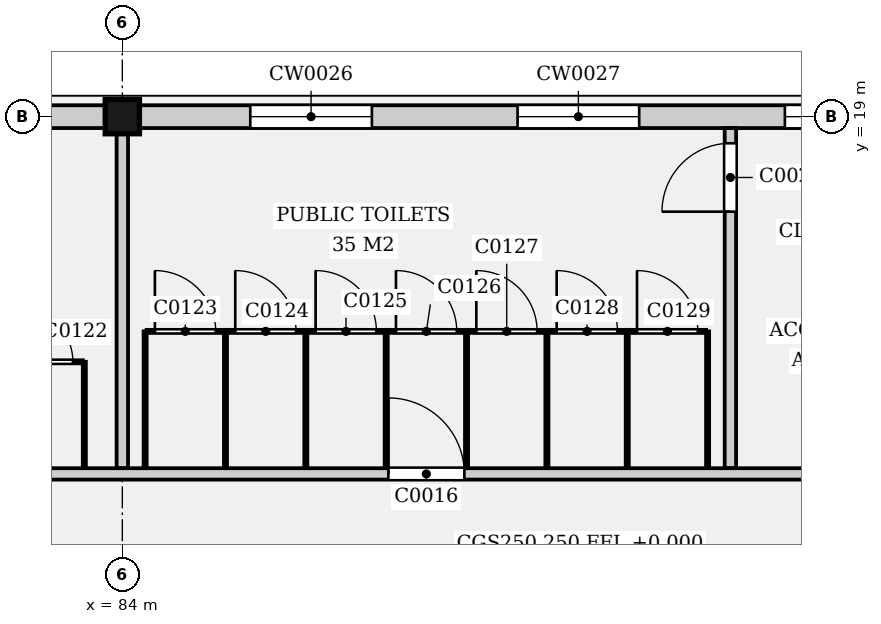
"""IFC4 building model, lengths in metres.
Left out: names, types, materials, properties, quantities, classifications, styles, units other than length and angle.
Written with IfcOpenShell. Run it as: python <this file> out.ifc"""

import sys

from ifc_helpers import new_model, si_unit, direction, frame, frame_2d, origin, origin_2d, place, context, subcontext, project, spatial, rectangle, extrude, element, fill, save


model = new_model("IFC4")
c1 = context("Model", 3, precision=1e-05, world=origin(), true_north=direction((0.0, 1.0)))
c2 = subcontext(c1, "Body", "Model", "MODEL_VIEW")
j1 = project(units=[si_unit("LENGTHUNIT", "METRE"), si_unit("PLANEANGLEUNIT", "RADIAN")], contexts=[c1])
p1 = place(None, origin())
s1 = spatial("IfcSite", under=j1, at=p1, CompositionType="ELEMENT")
p2 = place(p1, origin())
s2 = spatial("IfcBuilding", under=s1, at=p2, CompositionType="ELEMENT")
p3 = place(p2, origin())
s3 = spatial("IfcBuildingStorey", under=s2, at=p3, CompositionType="ELEMENT", Elevation=0.0)
p4 = place(p3, frame((84.0, 19.0, -0.25), z_axis=(0.0, 0.0, 1.0), x_axis=(1.0, 0.0, 0.0)))
e1 = element("IfcColumn", 1, at=p4, inside=s3, PredefinedType="COLUMN", context=c2, shape_type="SweptSolid", body=[
    extrude(rectangle(XDim=0.45, YDim=0.45, at=origin_2d()), origin(), (0.0, 0.0, 1.0), 5.25),
])
p5 = place(p3, frame((72.225, 19.0, 0.0), z_axis=(0.0, 0.0, 1.0), x_axis=(1.0, 0.0, 0.0)))
e2 = element("IfcWall", 2, at=p5, inside=s3, PredefinedType="ELEMENTEDWALL", context=c2, shape_type="SweptSolid", body=[
    extrude(rectangle(XDim=11.55, YDim=0.3, at=frame_2d((5.775, 0.0))), origin(), (0.0, 0.0, 1.0), 4.6),
])
p6 = place(p5, frame((1.458, 0.0, 2.5)))
e3 = element("IfcOpeningElement", 3, at=p6, cuts=e2, PredefinedType="OPENING", context=c2, shape_type="SweptSolid", body=[
    extrude(rectangle(XDim=1.6, YDim=1.0, at=frame_2d((0.8, 0.5))), frame((0.0, 0.16, 0.0), z_axis=(0.0, -1.0, 0.0), x_axis=(1.0, 0.0, 0.0)), (0.0, 0.0, 1.0), 0.32),
])
p7 = place(p5, frame((8.492, 0.0, 2.5)))
e4 = element("IfcOpeningElement", 4, at=p7, cuts=e2, PredefinedType="OPENING", context=c2, shape_type="SweptSolid", body=[
    extrude(rectangle(XDim=1.6, YDim=1.0, at=frame_2d((0.8, 0.5))), frame((0.0, 0.16, 0.0), z_axis=(0.0, -1.0, 0.0), x_axis=(1.0, 0.0, 0.0)), (0.0, 0.0, 1.0), 0.32),
])
p8 = place(p5, frame((4.875, 0.0, 0.0)))
e5 = element("IfcOpeningElement", 5, at=p8, cuts=e2, PredefinedType="OPENING", context=c2, shape_type="SweptSolid", body=[
    extrude(rectangle(XDim=1.8, YDim=2.4, at=frame_2d((0.9, 1.2))), frame((0.0, 0.16, 0.0), z_axis=(0.0, -1.0, 0.0), x_axis=(1.0, 0.0, 0.0)), (0.0, 0.0, 1.0), 0.32),
])
p9 = place(p3, frame((84.225, 19.0, 0.0), z_axis=(0.0, 0.0, 1.0), x_axis=(1.0, 0.0, 0.0)))
e6 = element("IfcWall", 6, at=p9, inside=s3, PredefinedType="ELEMENTEDWALL", context=c2, shape_type="SweptSolid", body=[
    extrude(rectangle(XDim=11.55, YDim=0.3, at=frame_2d((5.775, 0.0))), origin(), (0.0, 0.0, 1.0), 4.6),
])
p10 = place(p9, frame((1.458, 0.0, 2.5)))
e7 = element("IfcOpeningElement", 7, at=p10, cuts=e6, PredefinedType="OPENING", context=c2, shape_type="SweptSolid", body=[
    extrude(rectangle(XDim=1.6, YDim=1.0, at=frame_2d((0.8, 0.5))), frame((0.0, 0.16, 0.0), z_axis=(0.0, -1.0, 0.0), x_axis=(1.0, 0.0, 0.0)), (0.0, 0.0, 1.0), 0.32),
])
p11 = place(p9, frame((4.975, 0.0, 2.5)))
e8 = element("IfcOpeningElement", 8, at=p11, cuts=e6, PredefinedType="OPENING", context=c2, shape_type="SweptSolid", body=[
    extrude(rectangle(XDim=1.6, YDim=1.0, at=frame_2d((0.8, 0.5))), frame((0.0, 0.16, 0.0), z_axis=(0.0, -1.0, 0.0), x_axis=(1.0, 0.0, 0.0)), (0.0, 0.0, 1.0), 0.32),
])
p12 = place(p9, frame((8.492, 0.0, 2.5)))
e9 = element("IfcOpeningElement", 9, at=p12, cuts=e6, PredefinedType="OPENING", context=c2, shape_type="SweptSolid", body=[
    extrude(rectangle(XDim=1.6, YDim=1.0, at=frame_2d((0.8, 0.5))), frame((0.0, 0.16, 0.0), z_axis=(0.0, -1.0, 0.0), x_axis=(1.0, 0.0, 0.0)), (0.0, 0.0, 1.0), 0.32),
])
p13 = place(p3, frame((55.3, 14.3, 0.0), z_axis=(0.0, 0.0, 1.0), x_axis=(1.0, 0.0, 0.0)))
e10 = element("IfcWall", 10, at=p13, inside=s3, PredefinedType="PARTITIONING", context=c2, shape_type="SweptSolid", body=[
    extrude(rectangle(XDim=93.4, YDim=0.15, at=frame_2d((46.7, 0.0))), origin(), (0.0, 0.0, 1.0), 4.6),
])
p14 = place(p13, frame((15.8, 0.0, 0.0)))
e11 = element("IfcOpeningElement", 11, at=p14, cuts=e10, PredefinedType="OPENING", context=c2, shape_type="SweptSolid", body=[
    extrude(rectangle(XDim=1.8, YDim=2.4, at=frame_2d((0.9, 1.2))), frame((0.0, 0.085, 0.0), z_axis=(0.0, -1.0, 0.0), x_axis=(1.0, 0.0, 0.0)), (0.0, 0.0, 1.0), 0.17),
])
p15 = place(p13, frame((32.2, 0.0, 0.0)))
e12 = element("IfcOpeningElement", 12, at=p15, cuts=e10, PredefinedType="OPENING", context=c2, shape_type="SweptSolid", body=[
    extrude(rectangle(XDim=1.0, YDim=2.1, at=frame_2d((0.5, 1.05))), frame((0.0, 0.085, 0.0), z_axis=(0.0, -1.0, 0.0), x_axis=(1.0, 0.0, 0.0)), (0.0, 0.0, 1.0), 0.17),
])
p16 = place(p13, frame((38.2, 0.0, 0.0)))
e13 = element("IfcOpeningElement", 13, at=p16, cuts=e10, PredefinedType="OPENING", context=c2, shape_type="SweptSolid", body=[
    extrude(rectangle(XDim=1.0, YDim=2.1, at=frame_2d((0.5, 1.05))), frame((0.0, 0.085, 0.0), z_axis=(0.0, -1.0, 0.0), x_axis=(1.0, 0.0, 0.0)), (0.0, 0.0, 1.0), 0.17),
])
p17 = place(p13, frame((43.2, 0.0, 0.0)))
e14 = element("IfcOpeningElement", 14, at=p17, cuts=e10, PredefinedType="OPENING", context=c2, shape_type="SweptSolid", body=[
    extrude(rectangle(XDim=1.0, YDim=2.1, at=frame_2d((0.5, 1.05))), frame((0.0, 0.085, 0.0), z_axis=(0.0, -1.0, 0.0), x_axis=(1.0, 0.0, 0.0)), (0.0, 0.0, 1.0), 0.17),
])
p18 = place(p13, frame((49.2, 0.0, 0.0)))
e15 = element("IfcOpeningElement", 15, at=p18, cuts=e10, PredefinedType="OPENING", context=c2, shape_type="SweptSolid", body=[
    extrude(rectangle(XDim=1.0, YDim=2.1, at=frame_2d((0.5, 1.05))), frame((0.0, 0.085, 0.0), z_axis=(0.0, -1.0, 0.0), x_axis=(1.0, 0.0, 0.0)), (0.0, 0.0, 1.0), 0.17),
])
p19 = place(p13, frame((57.8, 0.0, 0.0)))
e16 = element("IfcOpeningElement", 16, at=p19, cuts=e10, PredefinedType="OPENING", context=c2, shape_type="SweptSolid", body=[
    extrude(rectangle(XDim=1.8, YDim=2.4, at=frame_2d((0.9, 1.2))), frame((0.0, 0.085, 0.0), z_axis=(0.0, -1.0, 0.0), x_axis=(1.0, 0.0, 0.0)), (0.0, 0.0, 1.0), 0.17),
])
p20 = place(p13, frame((69.8, 0.0, 0.0)))
e17 = element("IfcOpeningElement", 17, at=p20, cuts=e10, PredefinedType="OPENING", context=c2, shape_type="SweptSolid", body=[
    extrude(rectangle(XDim=1.8, YDim=2.4, at=frame_2d((0.9, 1.2))), frame((0.0, 0.085, 0.0), z_axis=(0.0, -1.0, 0.0), x_axis=(1.0, 0.0, 0.0)), (0.0, 0.0, 1.0), 0.17),
])
p21 = place(p13, frame((82.2, 0.0, 0.0)))
e18 = element("IfcOpeningElement", 18, at=p21, cuts=e10, PredefinedType="OPENING", context=c2, shape_type="SweptSolid", body=[
    extrude(rectangle(XDim=1.0, YDim=2.1, at=frame_2d((0.5, 1.05))), frame((0.0, 0.085, 0.0), z_axis=(0.0, -1.0, 0.0), x_axis=(1.0, 0.0, 0.0)), (0.0, 0.0, 1.0), 0.17),
])
p22 = place(p3, frame((84.0, 14.375, 0.0), z_axis=(0.0, 0.0, 1.0), x_axis=(0.0, 1.0, 0.0)))
e19 = element("IfcWall", 19, at=p22, inside=s3, PredefinedType="PARTITIONING", context=c2, shape_type="SweptSolid", body=[
    extrude(rectangle(XDim=4.4, YDim=0.15, at=frame_2d((2.2, 0.0))), origin(), (0.0, 0.0, 1.0), 4.6),
])
p23 = place(p3, frame((92.0, 14.375, 0.0), z_axis=(0.0, 0.0, 1.0), x_axis=(0.0, 1.0, 0.0)))
e20 = element("IfcWall", 20, at=p23, inside=s3, PredefinedType="PARTITIONING", context=c2, shape_type="SweptSolid", body=[
    extrude(rectangle(XDim=4.475, YDim=0.15, at=frame_2d((2.238, 0.0))), origin(), (0.0, 0.0, 1.0), 4.6),
])
p24 = place(p23, frame((3.375, 0.0, 0.0)))
e21 = element("IfcOpeningElement", 21, at=p24, cuts=e20, PredefinedType="OPENING", context=c2, shape_type="SweptSolid", body=[
    extrude(rectangle(XDim=0.9, YDim=2.1, at=frame_2d((0.45, 1.05))), frame((0.0, 0.085, 0.0), z_axis=(0.0, -1.0, 0.0), x_axis=(1.0, 0.0, 0.0)), (0.0, 0.0, 1.0), 0.17),
])
p25 = place(p3, frame((83.5, 14.375, 0.0), z_axis=(0.0, 0.0, 1.0), x_axis=(0.0, 1.0, 0.0)))
e22 = element("IfcWall", 22, at=p25, inside=s3, PredefinedType="PARTITIONING", context=c2, shape_type="SweptSolid", body=[
    extrude(rectangle(XDim=1.4, YDim=0.04, at=frame_2d((0.7, 0.0))), origin(), (0.0, 0.0, 1.0), 2.4),
])
p26 = place(p3, frame((82.52, 15.775, 0.0), z_axis=(0.0, 0.0, 1.0), x_axis=(1.0, 0.0, 0.0)))
e23 = element("IfcWall", 23, at=p26, inside=s3, PredefinedType="PARTITIONING", context=c2, shape_type="SweptSolid", body=[
    extrude(rectangle(XDim=0.96, YDim=0.04, at=frame_2d((0.48, 0.0))), origin(), (0.0, 0.0, 1.0), 2.4),
])
p27 = place(p26, frame((0.13, 0.0, 0.0)))
e24 = element("IfcOpeningElement", 24, at=p27, cuts=e23, PredefinedType="OPENING", context=c2, shape_type="SweptSolid", body=[
    extrude(rectangle(XDim=0.7, YDim=2.0, at=frame_2d((0.35, 1.0))), frame((0.0, 0.03, 0.0), z_axis=(0.0, -1.0, 0.0), x_axis=(1.0, 0.0, 0.0)), (0.0, 0.0, 1.0), 0.06),
])
for number, where, z_axis, x_axis in (
    (25, (84.3, 14.375, 0.0), (0.0, 0.0, 1.0), (0.0, 1.0, 0.0)),
    (26, (85.357, 14.375, 0.0), (0.0, 0.0, 1.0), (0.0, 1.0, 0.0)),
    (27, (86.414, 14.375, 0.0), (0.0, 0.0, 1.0), (0.0, 1.0, 0.0)),
    (28, (87.471, 14.375, 0.0), (0.0, 0.0, 1.0), (0.0, 1.0, 0.0)),
    (29, (88.529, 14.375, 0.0), (0.0, 0.0, 1.0), (0.0, 1.0, 0.0)),
    (30, (89.586, 14.375, 0.0), (0.0, 0.0, 1.0), (0.0, 1.0, 0.0)),
    (31, (90.643, 14.375, 0.0), (0.0, 0.0, 1.0), (0.0, 1.0, 0.0)),
    (32, (91.7, 14.375, 0.0), (0.0, 0.0, 1.0), (0.0, 1.0, 0.0)),
):
    element("IfcWall", number, at=place(p3, frame(where, z_axis=z_axis, x_axis=x_axis)), inside=s3, PredefinedType="PARTITIONING", context=c2, shape_type="SweptSolid", body=[
        extrude(rectangle(XDim=1.8, YDim=0.04, at=frame_2d((0.9, 0.0))), origin(), (0.0, 0.0, 1.0), 2.4),
    ])
p28 = place(p3, frame((84.32, 16.175, 0.0), z_axis=(0.0, 0.0, 1.0), x_axis=(1.0, 0.0, 0.0)))
e33 = element("IfcWall", 33, at=p28, inside=s3, PredefinedType="PARTITIONING", context=c2, shape_type="SweptSolid", body=[
    extrude(rectangle(XDim=1.017, YDim=0.04, at=frame_2d((0.509, 0.0))), origin(), (0.0, 0.0, 1.0), 2.4),
])
p29 = place(p28, frame((0.109, 0.0, 0.0)))
e34 = element("IfcOpeningElement", 34, at=p29, cuts=e33, PredefinedType="OPENING", context=c2, shape_type="SweptSolid", body=[
    extrude(rectangle(XDim=0.8, YDim=2.0, at=frame_2d((0.4, 1.0))), frame((0.0, 0.03, 0.0), z_axis=(0.0, -1.0, 0.0), x_axis=(1.0, 0.0, 0.0)), (0.0, 0.0, 1.0), 0.06),
])
p30 = place(p3, frame((85.377, 16.175, 0.0), z_axis=(0.0, 0.0, 1.0), x_axis=(1.0, 0.0, 0.0)))
e35 = element("IfcWall", 35, at=p30, inside=s3, PredefinedType="PARTITIONING", context=c2, shape_type="SweptSolid", body=[
    extrude(rectangle(XDim=1.017, YDim=0.04, at=frame_2d((0.509, 0.0))), origin(), (0.0, 0.0, 1.0), 2.4),
])
p31 = place(p30, frame((0.109, 0.0, 0.0)))
e36 = element("IfcOpeningElement", 36, at=p31, cuts=e35, PredefinedType="OPENING", context=c2, shape_type="SweptSolid", body=[
    extrude(rectangle(XDim=0.8, YDim=2.0, at=frame_2d((0.4, 1.0))), frame((0.0, 0.03, 0.0), z_axis=(0.0, -1.0, 0.0), x_axis=(1.0, 0.0, 0.0)), (0.0, 0.0, 1.0), 0.06),
])
p32 = place(p3, frame((86.434, 16.175, 0.0), z_axis=(0.0, 0.0, 1.0), x_axis=(1.0, 0.0, 0.0)))
e37 = element("IfcWall", 37, at=p32, inside=s3, PredefinedType="PARTITIONING", context=c2, shape_type="SweptSolid", body=[
    extrude(rectangle(XDim=1.017, YDim=0.04, at=frame_2d((0.509, 0.0))), origin(), (0.0, 0.0, 1.0), 2.4),
])
p33 = place(p32, frame((0.109, 0.0, 0.0)))
e38 = element("IfcOpeningElement", 38, at=p33, cuts=e37, PredefinedType="OPENING", context=c2, shape_type="SweptSolid", body=[
    extrude(rectangle(XDim=0.8, YDim=2.0, at=frame_2d((0.4, 1.0))), frame((0.0, 0.03, 0.0), z_axis=(0.0, -1.0, 0.0), x_axis=(1.0, 0.0, 0.0)), (0.0, 0.0, 1.0), 0.06),
])
p34 = place(p3, frame((87.491, 16.175, 0.0), z_axis=(0.0, 0.0, 1.0), x_axis=(1.0, 0.0, 0.0)))
e39 = element("IfcWall", 39, at=p34, inside=s3, PredefinedType="PARTITIONING", context=c2, shape_type="SweptSolid", body=[
    extrude(rectangle(XDim=1.017, YDim=0.04, at=frame_2d((0.509, 0.0))), origin(), (0.0, 0.0, 1.0), 2.4),
])
p35 = place(p34, frame((0.109, 0.0, 0.0)))
e40 = element("IfcOpeningElement", 40, at=p35, cuts=e39, PredefinedType="OPENING", context=c2, shape_type="SweptSolid", body=[
    extrude(rectangle(XDim=0.8, YDim=2.0, at=frame_2d((0.4, 1.0))), frame((0.0, 0.03, 0.0), z_axis=(0.0, -1.0, 0.0), x_axis=(1.0, 0.0, 0.0)), (0.0, 0.0, 1.0), 0.06),
])
p36 = place(p3, frame((88.549, 16.175, 0.0), z_axis=(0.0, 0.0, 1.0), x_axis=(1.0, 0.0, 0.0)))
e41 = element("IfcWall", 41, at=p36, inside=s3, PredefinedType="PARTITIONING", context=c2, shape_type="SweptSolid", body=[
    extrude(rectangle(XDim=1.017, YDim=0.04, at=frame_2d((0.509, 0.0))), origin(), (0.0, 0.0, 1.0), 2.4),
])
p37 = place(p36, frame((0.109, 0.0, 0.0)))
e42 = element("IfcOpeningElement", 42, at=p37, cuts=e41, PredefinedType="OPENING", context=c2, shape_type="SweptSolid", body=[
    extrude(rectangle(XDim=0.8, YDim=2.0, at=frame_2d((0.4, 1.0))), frame((0.0, 0.03, 0.0), z_axis=(0.0, -1.0, 0.0), x_axis=(1.0, 0.0, 0.0)), (0.0, 0.0, 1.0), 0.06),
])
p38 = place(p3, frame((89.606, 16.175, 0.0), z_axis=(0.0, 0.0, 1.0), x_axis=(1.0, 0.0, 0.0)))
e43 = element("IfcWall", 43, at=p38, inside=s3, PredefinedType="PARTITIONING", context=c2, shape_type="SweptSolid", body=[
    extrude(rectangle(XDim=1.017, YDim=0.04, at=frame_2d((0.509, 0.0))), origin(), (0.0, 0.0, 1.0), 2.4),
])
p39 = place(p38, frame((0.109, 0.0, 0.0)))
e44 = element("IfcOpeningElement", 44, at=p39, cuts=e43, PredefinedType="OPENING", context=c2, shape_type="SweptSolid", body=[
    extrude(rectangle(XDim=0.8, YDim=2.0, at=frame_2d((0.4, 1.0))), frame((0.0, 0.03, 0.0), z_axis=(0.0, -1.0, 0.0), x_axis=(1.0, 0.0, 0.0)), (0.0, 0.0, 1.0), 0.06),
])
p40 = place(p3, frame((90.663, 16.175, 0.0), z_axis=(0.0, 0.0, 1.0), x_axis=(1.0, 0.0, 0.0)))
e45 = element("IfcWall", 45, at=p40, inside=s3, PredefinedType="PARTITIONING", context=c2, shape_type="SweptSolid", body=[
    extrude(rectangle(XDim=1.017, YDim=0.04, at=frame_2d((0.509, 0.0))), origin(), (0.0, 0.0, 1.0), 2.4),
])
p41 = place(p40, frame((0.109, 0.0, 0.0)))
e46 = element("IfcOpeningElement", 46, at=p41, cuts=e45, PredefinedType="OPENING", context=c2, shape_type="SweptSolid", body=[
    extrude(rectangle(XDim=0.8, YDim=2.0, at=frame_2d((0.4, 1.0))), frame((0.0, 0.03, 0.0), z_axis=(0.0, -1.0, 0.0), x_axis=(1.0, 0.0, 0.0)), (0.0, 0.0, 1.0), 0.06),
])
p42 = place(p10, origin())
e47 = element("IfcWindow", 47, at=p42, inside=s3, PartitioningType="SINGLE_PANEL", PredefinedType="WINDOW", context=c2, shape_type="SweptSolid", body=[
    extrude(rectangle(XDim=1.6, YDim=1.0, at=frame_2d((0.8, 0.5))), frame((0.0, 0.03, 0.0), z_axis=(0.0, -1.0, 0.0), x_axis=(1.0, 0.0, 0.0)), (0.0, 0.0, 1.0), 0.06),
])
fill(e7, e47)
p43 = place(p11, origin())
e48 = element("IfcWindow", 48, at=p43, inside=s3, PartitioningType="SINGLE_PANEL", PredefinedType="WINDOW", context=c2, shape_type="SweptSolid", body=[
    extrude(rectangle(XDim=1.6, YDim=1.0, at=frame_2d((0.8, 0.5))), frame((0.0, 0.03, 0.0), z_axis=(0.0, -1.0, 0.0), x_axis=(1.0, 0.0, 0.0)), (0.0, 0.0, 1.0), 0.06),
])
fill(e8, e48)
p44 = place(p12, origin())
e49 = element("IfcWindow", 49, at=p44, inside=s3, PartitioningType="SINGLE_PANEL", PredefinedType="WINDOW", context=c2, shape_type="SweptSolid", body=[
    extrude(rectangle(XDim=1.6, YDim=1.0, at=frame_2d((0.8, 0.5))), frame((0.0, 0.03, 0.0), z_axis=(0.0, -1.0, 0.0), x_axis=(1.0, 0.0, 0.0)), (0.0, 0.0, 1.0), 0.06),
])
fill(e9, e49)
p45 = place(p15, origin())
e50 = element("IfcDoor", 50, at=p45, inside=s3, OperationType="SINGLE_SWING_LEFT", PredefinedType="DOOR", context=c2, shape_type="SweptSolid", body=[
    extrude(rectangle(XDim=1.0, YDim=2.1, at=frame_2d((0.5, 1.05))), frame((0.0, 0.025, 0.0), z_axis=(0.0, -1.0, 0.0), x_axis=(1.0, 0.0, 0.0)), (0.0, 0.0, 1.0), 0.05),
])
fill(e12, e50)
p46 = place(p24, origin())
e51 = element("IfcDoor", 51, at=p46, inside=s3, OperationType="SINGLE_SWING_LEFT", PredefinedType="DOOR", context=c2, shape_type="SweptSolid", body=[
    extrude(rectangle(XDim=0.9, YDim=2.1, at=frame_2d((0.45, 1.05))), frame((0.0, 0.025, 0.0), z_axis=(0.0, -1.0, 0.0), x_axis=(1.0, 0.0, 0.0)), (0.0, 0.0, 1.0), 0.05),
])
fill(e21, e51)
p47 = place(p27, origin())
e52 = element("IfcDoor", 52, at=p47, inside=s3, OperationType="SINGLE_SWING_LEFT", PredefinedType="DOOR", context=c2, shape_type="SweptSolid", body=[
    extrude(rectangle(XDim=0.7, YDim=2.0, at=frame_2d((0.35, 1.0))), frame((0.0, 0.02, 0.0), z_axis=(0.0, -1.0, 0.0), x_axis=(1.0, 0.0, 0.0)), (0.0, 0.0, 1.0), 0.04),
])
fill(e24, e52)
p48 = place(p29, origin())
e53 = element("IfcDoor", 53, at=p48, inside=s3, OperationType="SINGLE_SWING_LEFT", PredefinedType="DOOR", context=c2, shape_type="SweptSolid", body=[
    extrude(rectangle(XDim=0.8, YDim=2.0, at=frame_2d((0.4, 1.0))), frame((0.0, 0.02, 0.0), z_axis=(0.0, -1.0, 0.0), x_axis=(1.0, 0.0, 0.0)), (0.0, 0.0, 1.0), 0.04),
])
fill(e34, e53)
p49 = place(p31, origin())
e54 = element("IfcDoor", 54, at=p49, inside=s3, OperationType="SINGLE_SWING_LEFT", PredefinedType="DOOR", context=c2, shape_type="SweptSolid", body=[
    extrude(rectangle(XDim=0.8, YDim=2.0, at=frame_2d((0.4, 1.0))), frame((0.0, 0.02, 0.0), z_axis=(0.0, -1.0, 0.0), x_axis=(1.0, 0.0, 0.0)), (0.0, 0.0, 1.0), 0.04),
])
fill(e36, e54)
p50 = place(p33, origin())
e55 = element("IfcDoor", 55, at=p50, inside=s3, OperationType="SINGLE_SWING_LEFT", PredefinedType="DOOR", context=c2, shape_type="SweptSolid", body=[
    extrude(rectangle(XDim=0.8, YDim=2.0, at=frame_2d((0.4, 1.0))), frame((0.0, 0.02, 0.0), z_axis=(0.0, -1.0, 0.0), x_axis=(1.0, 0.0, 0.0)), (0.0, 0.0, 1.0), 0.04),
])
fill(e38, e55)
p51 = place(p35, origin())
e56 = element("IfcDoor", 56, at=p51, inside=s3, OperationType="SINGLE_SWING_LEFT", PredefinedType="DOOR", context=c2, shape_type="SweptSolid", body=[
    extrude(rectangle(XDim=0.8, YDim=2.0, at=frame_2d((0.4, 1.0))), frame((0.0, 0.02, 0.0), z_axis=(0.0, -1.0, 0.0), x_axis=(1.0, 0.0, 0.0)), (0.0, 0.0, 1.0), 0.04),
])
fill(e40, e56)
p52 = place(p37, origin())
e57 = element("IfcDoor", 57, at=p52, inside=s3, OperationType="SINGLE_SWING_LEFT", PredefinedType="DOOR", context=c2, shape_type="SweptSolid", body=[
    extrude(rectangle(XDim=0.8, YDim=2.0, at=frame_2d((0.4, 1.0))), frame((0.0, 0.02, 0.0), z_axis=(0.0, -1.0, 0.0), x_axis=(1.0, 0.0, 0.0)), (0.0, 0.0, 1.0), 0.04),
])
fill(e42, e57)
p53 = place(p39, origin())
e58 = element("IfcDoor", 58, at=p53, inside=s3, OperationType="SINGLE_SWING_LEFT", PredefinedType="DOOR", context=c2, shape_type="SweptSolid", body=[
    extrude(rectangle(XDim=0.8, YDim=2.0, at=frame_2d((0.4, 1.0))), frame((0.0, 0.02, 0.0), z_axis=(0.0, -1.0, 0.0), x_axis=(1.0, 0.0, 0.0)), (0.0, 0.0, 1.0), 0.04),
])
fill(e44, e58)
p54 = place(p41, origin())
e59 = element("IfcDoor", 59, at=p54, inside=s3, OperationType="SINGLE_SWING_LEFT", PredefinedType="DOOR", context=c2, shape_type="SweptSolid", body=[
    extrude(rectangle(XDim=0.8, YDim=2.0, at=frame_2d((0.4, 1.0))), frame((0.0, 0.02, 0.0), z_axis=(0.0, -1.0, 0.0), x_axis=(1.0, 0.0, 0.0)), (0.0, 0.0, 1.0), 0.04),
])
fill(e46, e59)
save(model, sys.argv[1])
